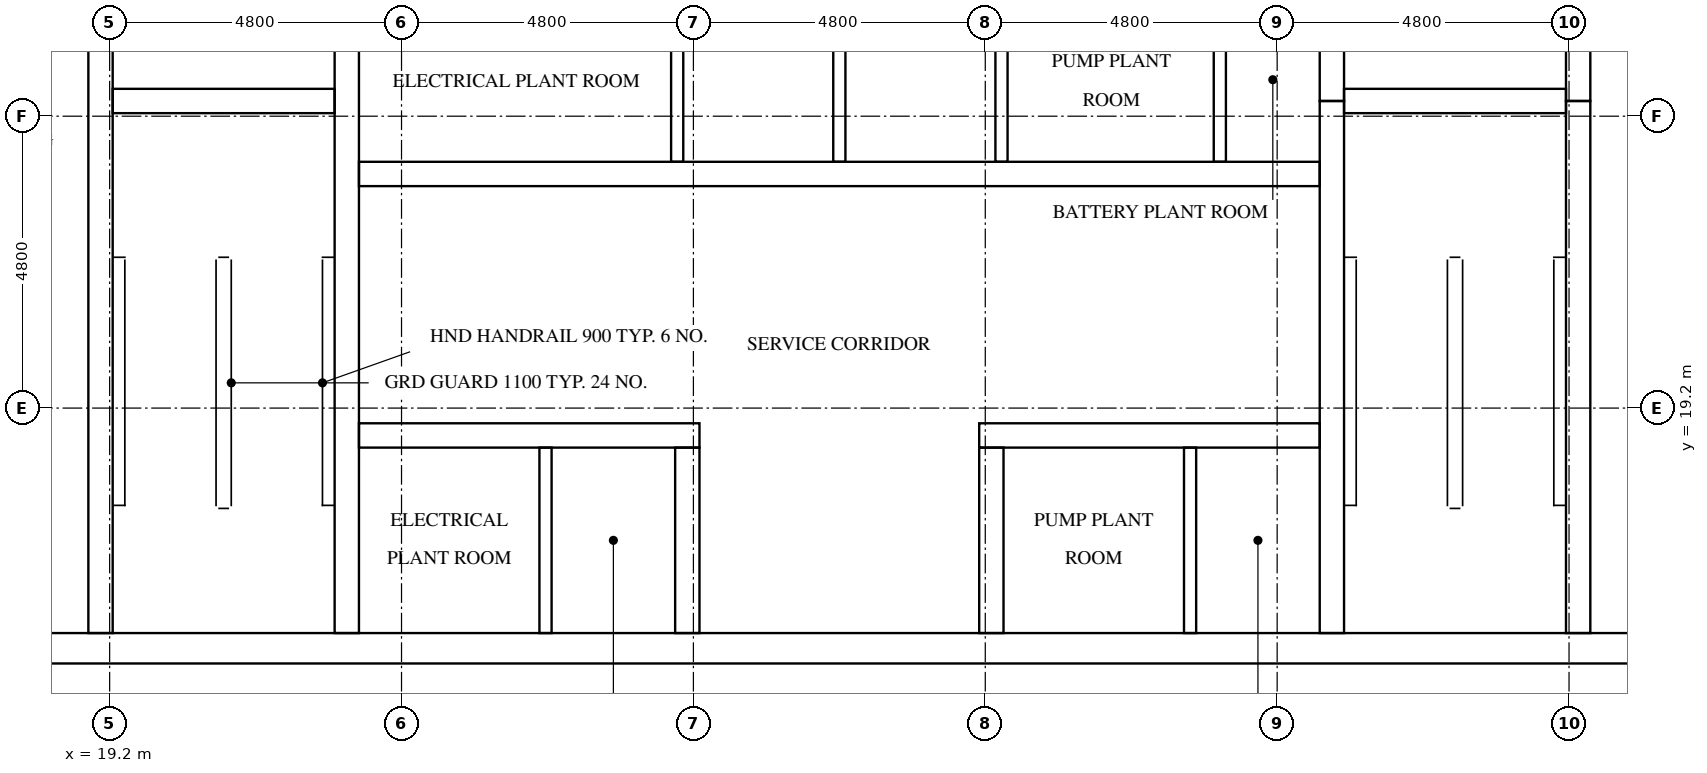
"""IFC4 building model, lengths in metres.
Left out: names, types, materials, properties, quantities, classifications, styles, units other than length and angle.
Written with IfcOpenShell. Run it as: python <this file> out.ifc"""

import sys

from ifc_helpers import new_model, si_unit, direction, frame, frame_2d, origin, place, context, subcontext, project, spatial, rectangle, extrude, element, fill, save


model = new_model("IFC4")
c1 = context("Model", 3, precision=1e-05, world=origin(), true_north=direction((0.0, 1.0)))
c2 = subcontext(c1, "Body", "Model", "MODEL_VIEW")
j1 = project(units=[si_unit("LENGTHUNIT", "METRE"), si_unit("PLANEANGLEUNIT", "RADIAN")], contexts=[c1])
p1 = place(None, origin())
s1 = spatial("IfcSite", under=j1, at=p1, CompositionType="ELEMENT")
p2 = place(p1, origin())
s2 = spatial("IfcBuilding", under=s1, at=p2, CompositionType="ELEMENT")
p3 = place(p2, frame((0.0, 0.0, 296.3)))
s3 = spatial("IfcBuildingStorey", under=s2, at=p3, CompositionType="ELEMENT", Elevation=296.3)
p4 = place(p3, frame((15.0, 15.25, 0.0), z_axis=(0.0, 0.0, 1.0), x_axis=(1.0, 0.0, 0.0)))
e1 = element("IfcWall", 1, at=p4, inside=s3, PredefinedType="SHEAR", context=c2, shape_type="SweptSolid", body=[
    extrude(rectangle(XDim=32.4, YDim=0.5, at=frame_2d((16.2, 0.0))), origin(), (0.0, 0.0, 1.0), 4.4),
])
p5 = place(p4, frame((15.3, 0.0, 0.0)))
e2 = element("IfcOpeningElement", 2, at=p5, cuts=e1, PredefinedType="OPENING", context=c2, shape_type="SweptSolid", body=[
    extrude(rectangle(XDim=1.8, YDim=2.1, at=frame_2d((0.9, 1.05))), frame((0.0, 0.26, 0.0), z_axis=(0.0, -1.0, 0.0), x_axis=(1.0, 0.0, 0.0)), (0.0, 0.0, 1.0), 0.52),
])
p6 = place(p3, frame((19.05, 15.5, 0.0), z_axis=(0.0, 0.0, 1.0), x_axis=(0.0, 1.0, 0.0)))
e3 = element("IfcWall", 3, at=p6, inside=s3, PredefinedType="SHEAR", context=c2, shape_type="SweptSolid", body=[
    extrude(rectangle(XDim=15.55, YDim=0.4, at=frame_2d((7.775, 0.0))), origin(), (0.0, 0.0, 1.0), 4.4),
])
p7 = place(p6, frame((9.95, 0.0, 0.0)))
e4 = element("IfcOpeningElement", 4, at=p7, cuts=e3, PredefinedType="OPENING", context=c2, shape_type="SweptSolid", body=[
    extrude(rectangle(XDim=1.1, YDim=2.1, at=frame_2d((0.55, 1.05))), frame((0.0, 0.21, 0.0), z_axis=(0.0, -1.0, 0.0), x_axis=(1.0, 0.0, 0.0)), (0.0, 0.0, 1.0), 0.42),
])
p8 = place(p6, frame((13.45, 0.0, 0.0)))
e5 = element("IfcOpeningElement", 5, at=p8, cuts=e3, PredefinedType="OPENING", context=c2, shape_type="SweptSolid", body=[
    extrude(rectangle(XDim=1.1, YDim=2.1, at=frame_2d((0.55, 1.05))), frame((0.0, 0.21, 0.0), z_axis=(0.0, -1.0, 0.0), x_axis=(1.0, 0.0, 0.0)), (0.0, 0.0, 1.0), 0.42),
])
p9 = place(p6, frame((0.7, 0.0, 0.0)))
e6 = element("IfcOpeningElement", 6, at=p9, cuts=e3, PredefinedType="OPENING", context=c2, shape_type="SweptSolid", body=[
    extrude(rectangle(XDim=1.2, YDim=2.1, at=frame_2d((0.6, 1.05))), frame((0.0, 0.21, 0.0), z_axis=(0.0, -1.0, 0.0), x_axis=(1.0, 0.0, 0.0)), (0.0, 0.0, 1.0), 0.42),
])
p10 = place(p3, frame((23.1, 15.5, 0.0), z_axis=(0.0, 0.0, 1.0), x_axis=(0.0, 1.0, 0.0)))
e7 = element("IfcWall", 7, at=p10, inside=s3, PredefinedType="SHEAR", context=c2, shape_type="SweptSolid", body=[
    extrude(rectangle(XDim=21.8, YDim=0.4, at=frame_2d((10.9, 0.0))), origin(), (0.0, 0.0, 1.0), 4.4),
])
p11 = place(p3, frame((39.3, 15.5, 0.0), z_axis=(0.0, 0.0, 1.0), x_axis=(0.0, 1.0, 0.0)))
e8 = element("IfcWall", 8, at=p11, inside=s3, PredefinedType="SHEAR", context=c2, shape_type="SweptSolid", body=[
    extrude(rectangle(XDim=8.75, YDim=0.4, at=frame_2d((4.375, 0.0))), origin(), (0.0, 0.0, 1.0), 4.4),
])
p12 = place(p3, frame((39.3, 24.25, 0.0), z_axis=(0.0, 0.0, 1.0), x_axis=(0.0, 1.0, 0.0)))
e9 = element("IfcWall", 9, at=p12, inside=s3, PredefinedType="SHEAR", context=c2, shape_type="SweptSolid", body=[
    extrude(rectangle(XDim=3.5, YDim=0.4, at=frame_2d((1.75, 0.0))), origin(), (0.0, 0.0, 1.0), 4.4),
])
p13 = place(p3, frame((43.35, 15.5, 0.0), z_axis=(0.0, 0.0, 1.0), x_axis=(0.0, 1.0, 0.0)))
e10 = element("IfcWall", 10, at=p13, inside=s3, PredefinedType="SHEAR", context=c2, shape_type="SweptSolid", body=[
    extrude(rectangle(XDim=8.75, YDim=0.4, at=frame_2d((4.375, 0.0))), origin(), (0.0, 0.0, 1.0), 4.4),
])
p14 = place(p13, frame((0.7, 0.0, 0.0)))
e11 = element("IfcOpeningElement", 11, at=p14, cuts=e10, PredefinedType="OPENING", context=c2, shape_type="SweptSolid", body=[
    extrude(rectangle(XDim=1.2, YDim=2.1, at=frame_2d((0.6, 1.05))), frame((0.0, 0.21, 0.0), z_axis=(0.0, -1.0, 0.0), x_axis=(1.0, 0.0, 0.0)), (0.0, 0.0, 1.0), 0.42),
])
p15 = place(p3, frame((43.35, 24.25, 0.0), z_axis=(0.0, 0.0, 1.0), x_axis=(0.0, 1.0, 0.0)))
e12 = element("IfcWall", 12, at=p15, inside=s3, PredefinedType="SHEAR", context=c2, shape_type="SweptSolid", body=[
    extrude(rectangle(XDim=3.5, YDim=0.4, at=frame_2d((1.75, 0.0))), origin(), (0.0, 0.0, 1.0), 4.4),
])
p16 = place(p15, frame((1.2, 0.0, 0.0)))
e13 = element("IfcOpeningElement", 13, at=p16, cuts=e12, PredefinedType="OPENING", context=c2, shape_type="SweptSolid", body=[
    extrude(rectangle(XDim=1.1, YDim=2.1, at=frame_2d((0.55, 1.05))), frame((0.0, 0.21, 0.0), z_axis=(0.0, -1.0, 0.0), x_axis=(1.0, 0.0, 0.0)), (0.0, 0.0, 1.0), 0.42),
])
for number, where, z_axis, x_axis in (
    (14, (19.25, 24.25, 0.0), (0.0, 0.0, 1.0), (1.0, 0.0, 0.0)),
    (15, (39.5, 24.25, 0.0), (0.0, 0.0, 1.0), (1.0, 0.0, 0.0)),
):
    element("IfcWall", number, at=place(p3, frame(where, z_axis=z_axis, x_axis=x_axis)), inside=s3, PredefinedType="SHEAR", context=c2, shape_type="SweptSolid", body=[
        extrude(rectangle(XDim=3.65, YDim=0.4, at=frame_2d((1.825, 0.0))), origin(), (0.0, 0.0, 1.0), 4.4),
    ])
p17 = place(p3, frame((23.3, 18.75, 0.0), z_axis=(0.0, 0.0, 1.0), x_axis=(1.0, 0.0, 0.0)))
e16 = element("IfcWall", 16, at=p17, inside=s3, PredefinedType="SHEAR", context=c2, shape_type="SweptSolid", body=[
    extrude(rectangle(XDim=5.6, YDim=0.4, at=frame_2d((2.8, 0.0))), origin(), (0.0, 0.0, 1.0), 4.4),
])
p18 = place(p17, frame((0.984, 0.0, 0.0)))
e17 = element("IfcOpeningElement", 17, at=p18, cuts=e16, PredefinedType="OPENING", context=c2, shape_type="SweptSolid", body=[
    extrude(rectangle(XDim=1.0, YDim=2.1, at=frame_2d((0.5, 1.05))), frame((0.0, 0.21, 0.0), z_axis=(0.0, -1.0, 0.0), x_axis=(1.0, 0.0, 0.0)), (0.0, 0.0, 1.0), 0.42),
])
p19 = place(p17, frame((3.684, 0.0, 0.0)))
e18 = element("IfcOpeningElement", 18, at=p19, cuts=e16, PredefinedType="OPENING", context=c2, shape_type="SweptSolid", body=[
    extrude(rectangle(XDim=1.0, YDim=2.1, at=frame_2d((0.5, 1.05))), frame((0.0, 0.21, 0.0), z_axis=(0.0, -1.0, 0.0), x_axis=(1.0, 0.0, 0.0)), (0.0, 0.0, 1.0), 0.42),
])
p20 = place(p3, frame((33.5, 18.75, 0.0), z_axis=(0.0, 0.0, 1.0), x_axis=(1.0, 0.0, 0.0)))
e19 = element("IfcWall", 19, at=p20, inside=s3, PredefinedType="SHEAR", context=c2, shape_type="SweptSolid", body=[
    extrude(rectangle(XDim=5.6, YDim=0.4, at=frame_2d((2.8, 0.0))), origin(), (0.0, 0.0, 1.0), 4.4),
])
p21 = place(p20, frame((1.384, 0.0, 0.0)))
e20 = element("IfcOpeningElement", 20, at=p21, cuts=e19, PredefinedType="OPENING", context=c2, shape_type="SweptSolid", body=[
    extrude(rectangle(XDim=1.0, YDim=2.1, at=frame_2d((0.5, 1.05))), frame((0.0, 0.21, 0.0), z_axis=(0.0, -1.0, 0.0), x_axis=(1.0, 0.0, 0.0)), (0.0, 0.0, 1.0), 0.42),
])
p22 = place(p20, frame((4.084, 0.0, 0.0)))
e21 = element("IfcOpeningElement", 21, at=p22, cuts=e19, PredefinedType="OPENING", context=c2, shape_type="SweptSolid", body=[
    extrude(rectangle(XDim=1.0, YDim=2.1, at=frame_2d((0.5, 1.05))), frame((0.0, 0.21, 0.0), z_axis=(0.0, -1.0, 0.0), x_axis=(1.0, 0.0, 0.0)), (0.0, 0.0, 1.0), 0.42),
])
p23 = place(p3, frame((23.3, 23.05, 0.0), z_axis=(0.0, 0.0, 1.0), x_axis=(1.0, 0.0, 0.0)))
e22 = element("IfcWall", 22, at=p23, inside=s3, PredefinedType="SHEAR", context=c2, shape_type="SweptSolid", body=[
    extrude(rectangle(XDim=15.8, YDim=0.4, at=frame_2d((7.9, 0.0))), origin(), (0.0, 0.0, 1.0), 4.4),
])
p24 = place(p23, frame((2.067, 0.0, 0.0)))
e23 = element("IfcOpeningElement", 23, at=p24, cuts=e22, PredefinedType="OPENING", context=c2, shape_type="SweptSolid", body=[
    extrude(rectangle(XDim=1.0, YDim=2.1, at=frame_2d((0.5, 1.05))), frame((0.0, 0.21, 0.0), z_axis=(0.0, -1.0, 0.0), x_axis=(1.0, 0.0, 0.0)), (0.0, 0.0, 1.0), 0.42),
])
p25 = place(p23, frame((11.862, 0.0, 0.0)))
e24 = element("IfcOpeningElement", 24, at=p25, cuts=e22, PredefinedType="OPENING", context=c2, shape_type="SweptSolid", body=[
    extrude(rectangle(XDim=1.0, YDim=2.1, at=frame_2d((0.5, 1.05))), frame((0.0, 0.21, 0.0), z_axis=(0.0, -1.0, 0.0), x_axis=(1.0, 0.0, 0.0)), (0.0, 0.0, 1.0), 0.42),
])
p26 = place(p23, frame((14.529, 0.0, 0.0)))
e25 = element("IfcOpeningElement", 25, at=p26, cuts=e22, PredefinedType="OPENING", context=c2, shape_type="SweptSolid", body=[
    extrude(rectangle(XDim=1.0, YDim=2.1, at=frame_2d((0.5, 1.05))), frame((0.0, 0.21, 0.0), z_axis=(0.0, -1.0, 0.0), x_axis=(1.0, 0.0, 0.0)), (0.0, 0.0, 1.0), 0.42),
])
for number, where, z_axis, x_axis in (
    (26, (28.7, 15.5, 0.0), (0.0, 0.0, 1.0), (0.0, 1.0, 0.0)),
    (27, (33.7, 15.5, 0.0), (0.0, 0.0, 1.0), (0.0, 1.0, 0.0)),
):
    element("IfcWall", number, at=place(p3, frame(where, z_axis=z_axis, x_axis=x_axis)), inside=s3, PredefinedType="SHEAR", context=c2, shape_type="SweptSolid", body=[
        extrude(rectangle(XDim=3.05, YDim=0.4, at=frame_2d((1.525, 0.0))), origin(), (0.0, 0.0, 1.0), 4.4),
    ])
for number, where, z_axis, x_axis in (
    (28, (28.533, 23.25, 0.0), (0.0, 0.0, 1.0), (0.0, 1.0, 0.0)),
    (29, (31.2, 23.25, 0.0), (0.0, 0.0, 1.0), (0.0, 1.0, 0.0)),
    (30, (33.867, 23.25, 0.0), (0.0, 0.0, 1.0), (0.0, 1.0, 0.0)),
):
    element("IfcWall", number, at=place(p3, frame(where, z_axis=z_axis, x_axis=x_axis)), inside=s3, PredefinedType="SOLIDWALL", context=c2, shape_type="SweptSolid", body=[
        extrude(rectangle(XDim=2.7, YDim=0.2, at=frame_2d((1.35, 0.0))), origin(), (0.0, 0.0, 1.0), 4.4),
    ])
p27 = place(p3, frame((37.457, 23.25, 0.0), z_axis=(0.0, 0.0, 1.0), x_axis=(0.0, 1.0, 0.0)))
e31 = element("IfcWall", 31, at=p27, inside=s3, PredefinedType="PARTITIONING", context=c2, shape_type="SweptSolid", body=[
    extrude(rectangle(XDim=2.7, YDim=0.2, at=frame_2d((1.35, 0.0))), origin(), (0.0, 0.0, 1.0), 4.4),
])
for number, where, z_axis, x_axis in (
    (32, (26.368, 15.5, 0.0), (0.0, 0.0, 1.0), (0.0, 1.0, 0.0)),
    (33, (36.968, 15.5, 0.0), (0.0, 0.0, 1.0), (0.0, 1.0, 0.0)),
):
    element("IfcWall", number, at=place(p3, frame(where, z_axis=z_axis, x_axis=x_axis)), inside=s3, PredefinedType="PARTITIONING", context=c2, shape_type="SweptSolid", body=[
        extrude(rectangle(XDim=3.05, YDim=0.2, at=frame_2d((1.525, 0.0))), origin(), (0.0, 0.0, 1.0), 4.4),
    ])
p28 = place(p9, frame((1.2, 0.0, 0.0), z_axis=(0.0, 0.0, 1.0), x_axis=(-1.0, 0.0, 0.0)))
e34 = element("IfcDoor", 34, at=p28, inside=s3, OperationType="SINGLE_SWING_LEFT", PredefinedType="DOOR", context=c2, shape_type="SweptSolid", body=[
    extrude(rectangle(XDim=1.2, YDim=2.1, at=frame_2d((0.6, 1.05))), frame((0.0, 0.025, 0.0), z_axis=(0.0, -1.0, 0.0), x_axis=(1.0, 0.0, 0.0)), (0.0, 0.0, 1.0), 0.05),
])
fill(e6, e34)
p29 = place(p14, origin())
e35 = element("IfcDoor", 35, at=p29, inside=s3, OperationType="SINGLE_SWING_RIGHT", PredefinedType="DOOR", context=c2, shape_type="SweptSolid", body=[
    extrude(rectangle(XDim=1.2, YDim=2.1, at=frame_2d((0.6, 1.05))), frame((0.0, 0.025, 0.0), z_axis=(0.0, -1.0, 0.0), x_axis=(1.0, 0.0, 0.0)), (0.0, 0.0, 1.0), 0.05),
])
fill(e11, e35)
p30 = place(p5, frame((1.8, 0.0, 0.0), z_axis=(0.0, 0.0, 1.0), x_axis=(-1.0, 0.0, 0.0)))
e36 = element("IfcDoor", 36, at=p30, inside=s3, OperationType="DOUBLE_DOOR_SINGLE_SWING", PredefinedType="DOOR", context=c2, shape_type="SweptSolid", body=[
    extrude(rectangle(XDim=1.8, YDim=2.1, at=frame_2d((0.9, 1.05))), frame((0.0, 0.025, 0.0), z_axis=(0.0, -1.0, 0.0), x_axis=(1.0, 0.0, 0.0)), (0.0, 0.0, 1.0), 0.05),
])
fill(e2, e36)
p31 = place(p24, frame((1.0, 0.0, 0.0), z_axis=(0.0, 0.0, 1.0), x_axis=(-1.0, 0.0, 0.0)))
e37 = element("IfcDoor", 37, at=p31, inside=s3, OperationType="SINGLE_SWING_RIGHT", PredefinedType="DOOR", context=c2, shape_type="SweptSolid", body=[
    extrude(rectangle(XDim=1.0, YDim=2.1, at=frame_2d((0.5, 1.05))), frame((0.0, 0.025, 0.0), z_axis=(0.0, -1.0, 0.0), x_axis=(1.0, 0.0, 0.0)), (0.0, 0.0, 1.0), 0.05),
])
fill(e23, e37)
p32 = place(p25, frame((1.0, 0.0, 0.0), z_axis=(0.0, 0.0, 1.0), x_axis=(-1.0, 0.0, 0.0)))
e38 = element("IfcDoor", 38, at=p32, inside=s3, OperationType="SINGLE_SWING_LEFT", PredefinedType="DOOR", context=c2, shape_type="SweptSolid", body=[
    extrude(rectangle(XDim=1.0, YDim=2.1, at=frame_2d((0.5, 1.05))), frame((0.0, 0.025, 0.0), z_axis=(0.0, -1.0, 0.0), x_axis=(1.0, 0.0, 0.0)), (0.0, 0.0, 1.0), 0.05),
])
fill(e24, e38)
p33 = place(p26, frame((1.0, 0.0, 0.0), z_axis=(0.0, 0.0, 1.0), x_axis=(-1.0, 0.0, 0.0)))
e39 = element("IfcDoor", 39, at=p33, inside=s3, OperationType="SINGLE_SWING_RIGHT", PredefinedType="DOOR", context=c2, shape_type="SweptSolid", body=[
    extrude(rectangle(XDim=1.0, YDim=2.1, at=frame_2d((0.5, 1.05))), frame((0.0, 0.025, 0.0), z_axis=(0.0, -1.0, 0.0), x_axis=(1.0, 0.0, 0.0)), (0.0, 0.0, 1.0), 0.05),
])
fill(e25, e39)
p34 = place(p18, origin())
e40 = element("IfcDoor", 40, at=p34, inside=s3, OperationType="SINGLE_SWING_LEFT", PredefinedType="DOOR", context=c2, shape_type="SweptSolid", body=[
    extrude(rectangle(XDim=1.0, YDim=2.1, at=frame_2d((0.5, 1.05))), frame((0.0, 0.025, 0.0), z_axis=(0.0, -1.0, 0.0), x_axis=(1.0, 0.0, 0.0)), (0.0, 0.0, 1.0), 0.05),
])
fill(e17, e40)
p35 = place(p19, origin())
e41 = element("IfcDoor", 41, at=p35, inside=s3, OperationType="SINGLE_SWING_RIGHT", PredefinedType="DOOR", context=c2, shape_type="SweptSolid", body=[
    extrude(rectangle(XDim=1.0, YDim=2.1, at=frame_2d((0.5, 1.05))), frame((0.0, 0.025, 0.0), z_axis=(0.0, -1.0, 0.0), x_axis=(1.0, 0.0, 0.0)), (0.0, 0.0, 1.0), 0.05),
])
fill(e18, e41)
p36 = place(p21, origin())
e42 = element("IfcDoor", 42, at=p36, inside=s3, OperationType="SINGLE_SWING_LEFT", PredefinedType="DOOR", context=c2, shape_type="SweptSolid", body=[
    extrude(rectangle(XDim=1.0, YDim=2.1, at=frame_2d((0.5, 1.05))), frame((0.0, 0.025, 0.0), z_axis=(0.0, -1.0, 0.0), x_axis=(1.0, 0.0, 0.0)), (0.0, 0.0, 1.0), 0.05),
])
fill(e20, e42)
p37 = place(p22, origin())
e43 = element("IfcDoor", 43, at=p37, inside=s3, OperationType="SINGLE_SWING_RIGHT", PredefinedType="DOOR", context=c2, shape_type="SweptSolid", body=[
    extrude(rectangle(XDim=1.0, YDim=2.1, at=frame_2d((0.5, 1.05))), frame((0.0, 0.025, 0.0), z_axis=(0.0, -1.0, 0.0), x_axis=(1.0, 0.0, 0.0)), (0.0, 0.0, 1.0), 0.05),
])
fill(e21, e43)
save(model, sys.argv[1])
